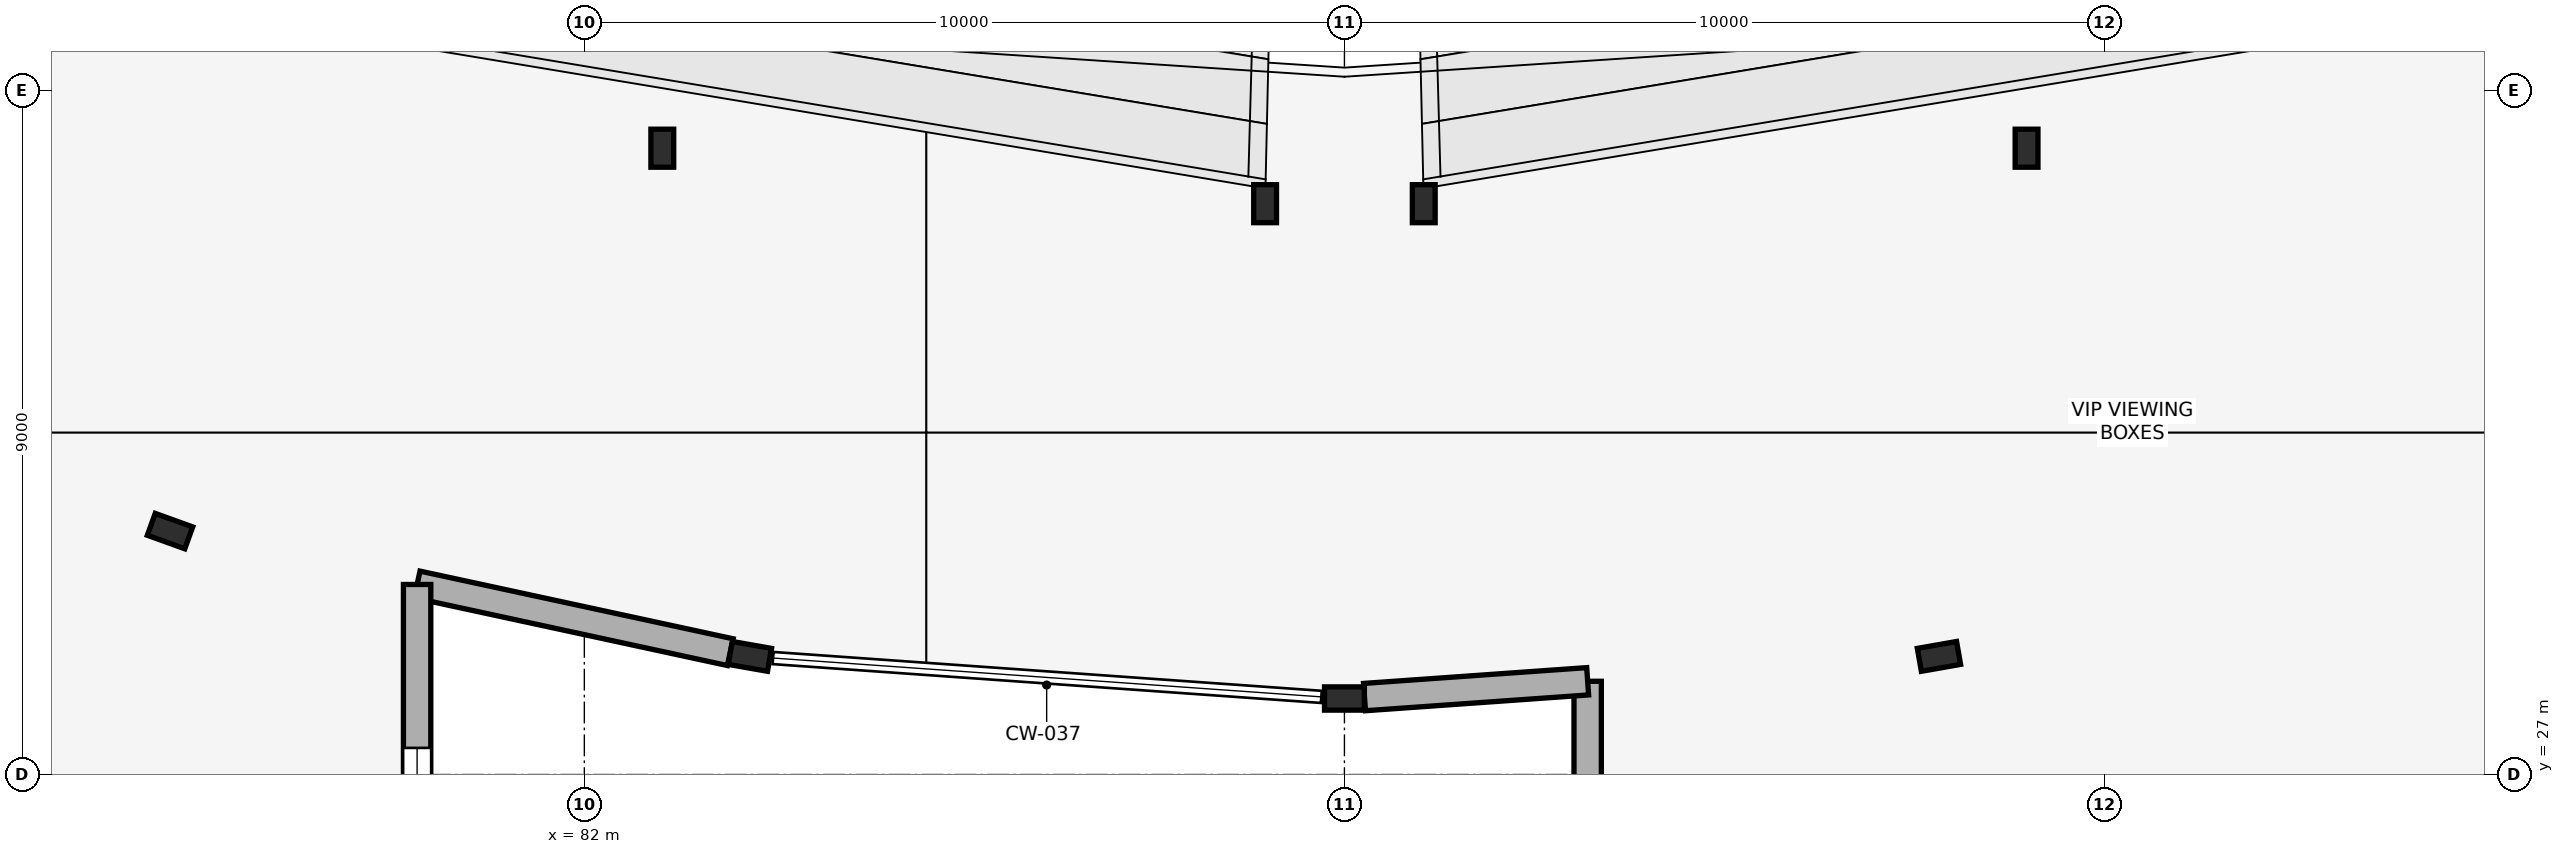
"""IFC4 building model, lengths in metres.
Left out: names, types, materials, properties, quantities, classifications, styles, units other than length and angle.
Written with IfcOpenShell. Run it as: python <this file> out.ifc"""

import sys

from ifc_helpers import new_model, si_unit, direction, frame, frame_2d, origin, origin_2d, place, context, subcontext, project, spatial, rectangle, i_section, extrude, element, fill, save


model = new_model("IFC4")
c1 = context("Model", 3, precision=1e-05, world=origin(), true_north=direction((0.0, 1.0)))
c2 = subcontext(c1, "Body", "Model", "MODEL_VIEW")
j1 = project(units=[si_unit("LENGTHUNIT", "METRE"), si_unit("PLANEANGLEUNIT", "RADIAN")], contexts=[c1])
p1 = place(None, origin())
s1 = spatial("IfcSite", under=j1, at=p1, CompositionType="ELEMENT")
p2 = place(p1, origin())
s2 = spatial("IfcBuilding", under=s1, at=p2, CompositionType="ELEMENT")
p3 = place(p2, frame((0.0, 0.0, 15.0)))
s3 = spatial("IfcBuildingStorey", under=s2, at=p3, CompositionType="ELEMENT", Elevation=15.0)
for number, where, z_axis, x_axis in (
    (1, (76.549, 30.202, 0.0), (0.0, 0.0, 1.0), (-0.34, -0.941, 0.0)),
    (2, (84.178, 28.554, 0.0), (0.0, 0.0, 1.0), (-0.173, -0.985, 0.0)),
    (3, (92.0, 28.0, 0.0), (0.0, 0.0, 1.0), (0.0, -1.0, 0.0)),
    (4, (99.822, 28.554, 0.0), (0.0, 0.0, 1.0), (0.173, -0.985, 0.0)),
):
    element("IfcColumn", number, at=place(p3, frame(where, z_axis=z_axis, x_axis=x_axis)), inside=s3, PredefinedType="COLUMN", context=c2, shape_type="SweptSolid", body=[
        extrude(i_section(OverallWidth=0.306, OverallDepth=0.524, WebThickness=0.021, FlangeThickness=0.04, FilletRadius=0.027, at=origin_2d()), origin(), (0.0, 0.0, 1.0), 4.5),
    ])
for number, where, z_axis, x_axis in (
    (5, (90.956, 34.51, 0.0), (0.0, 0.0, 1.0), (1.0, 0.0, 0.0)),
    (6, (93.044, 34.51, 0.0), (0.0, 0.0, 1.0), (1.0, 0.0, 0.0)),
    (7, (83.026, 35.24, 0.0), (0.0, 0.0, 1.0), (1.0, 0.0, 0.0)),
    (8, (100.974, 35.24, 0.0), (0.0, 0.0, 1.0), (1.0, 0.0, 0.0)),
):
    element("IfcColumn", number, at=place(p3, frame(where, z_axis=z_axis, x_axis=x_axis)), inside=s3, PredefinedType="COLUMN", context=c2, shape_type="SweptSolid", body=[
        extrude(i_section(OverallWidth=0.3, OverallDepth=0.5, WebThickness=0.014, FlangeThickness=0.028, FilletRadius=0.027, at=origin_2d()), origin(), (0.0, 0.0, 1.0), 4.5),
    ])
p4 = place(p3, frame((95.2, 19.8, 0.0), z_axis=(0.0, 0.0, 1.0), x_axis=(0.0, 1.0, 0.0)))
e9 = element("IfcWall", 9, at=p4, inside=s3, PredefinedType="STANDARD", context=c2, shape_type="SweptSolid", body=[
    extrude(rectangle(XDim=8.427, YDim=0.36, at=frame_2d((4.213, 0.0))), origin(), (0.0, 0.0, 1.0), 4.25),
])
p5 = place(p4, frame((2.713, 0.0, 0.85)))
e10 = element("IfcOpeningElement", 10, at=p5, cuts=e9, PredefinedType="OPENING", context=c2, shape_type="SweptSolid", body=[
    extrude(rectangle(XDim=3.0, YDim=2.1, at=frame_2d((1.5, 1.05))), frame((0.0, 0.19, 0.0), z_axis=(0.0, -1.0, 0.0), x_axis=(1.0, 0.0, 0.0)), (0.0, 0.0, 1.0), 0.38),
])
p6 = place(p3, frame((95.2, 28.227, 0.0), z_axis=(0.0, 0.0, 1.0), x_axis=(-0.997499794668, -0.070669368456, 0.0)))
e11 = element("IfcWall", 11, at=p6, inside=s3, PredefinedType="STANDARD", context=c2, shape_type="SweptSolid", body=[
    extrude(rectangle(XDim=2.943, YDim=0.36, at=frame_2d((1.472, 0.0))), origin(), (0.0, 0.0, 1.0), 3.562),
])
p7 = place(p3, frame((83.92, 28.61, 0.0), z_axis=(0.0, 0.0, 1.0), x_axis=(-0.977448427312, 0.211174269138, 0.0)))
e12 = element("IfcWall", 12, at=p7, inside=s3, PredefinedType="STANDARD", context=c2, shape_type="SweptSolid", body=[
    extrude(rectangle(XDim=4.215, YDim=0.36, at=frame_2d((2.107, 0.0))), origin(), (0.0, 0.0, 1.0), 3.562),
])
p8 = place(p3, frame((79.8, 29.5, 0.0), z_axis=(0.0, 0.0, 1.0), x_axis=(0.0, -1.0, 0.0)))
e13 = element("IfcWall", 13, at=p8, inside=s3, PredefinedType="STANDARD", context=c2, shape_type="SweptSolid", body=[
    extrude(rectangle(XDim=7.3, YDim=0.36, at=frame_2d((3.65, 0.0))), origin(), (0.0, 0.0, 1.0), 4.25),
])
p9 = place(p8, frame((2.15, 0.0, 0.85)))
e14 = element("IfcOpeningElement", 14, at=p9, cuts=e13, PredefinedType="OPENING", context=c2, shape_type="SweptSolid", body=[
    extrude(rectangle(XDim=3.0, YDim=2.1, at=frame_2d((1.5, 1.05))), frame((0.0, 0.19, 0.0), z_axis=(0.0, -1.0, 0.0), x_axis=(1.0, 0.0, 0.0)), (0.0, 0.0, 1.0), 0.38),
])
p10 = place(p9, origin())
e15 = element("IfcWindow", 15, at=p10, inside=s3, PartitioningType="SINGLE_PANEL", PredefinedType="WINDOW", context=c2, shape_type="SweptSolid", body=[
    extrude(rectangle(XDim=3.0, YDim=2.1, at=frame_2d((1.5, 1.05))), frame((0.0, 0.03, 0.0), z_axis=(0.0, -1.0, 0.0), x_axis=(1.0, 0.0, 0.0)), (0.0, 0.0, 1.0), 0.06),
])
fill(e14, e15)
save(model, sys.argv[1])
